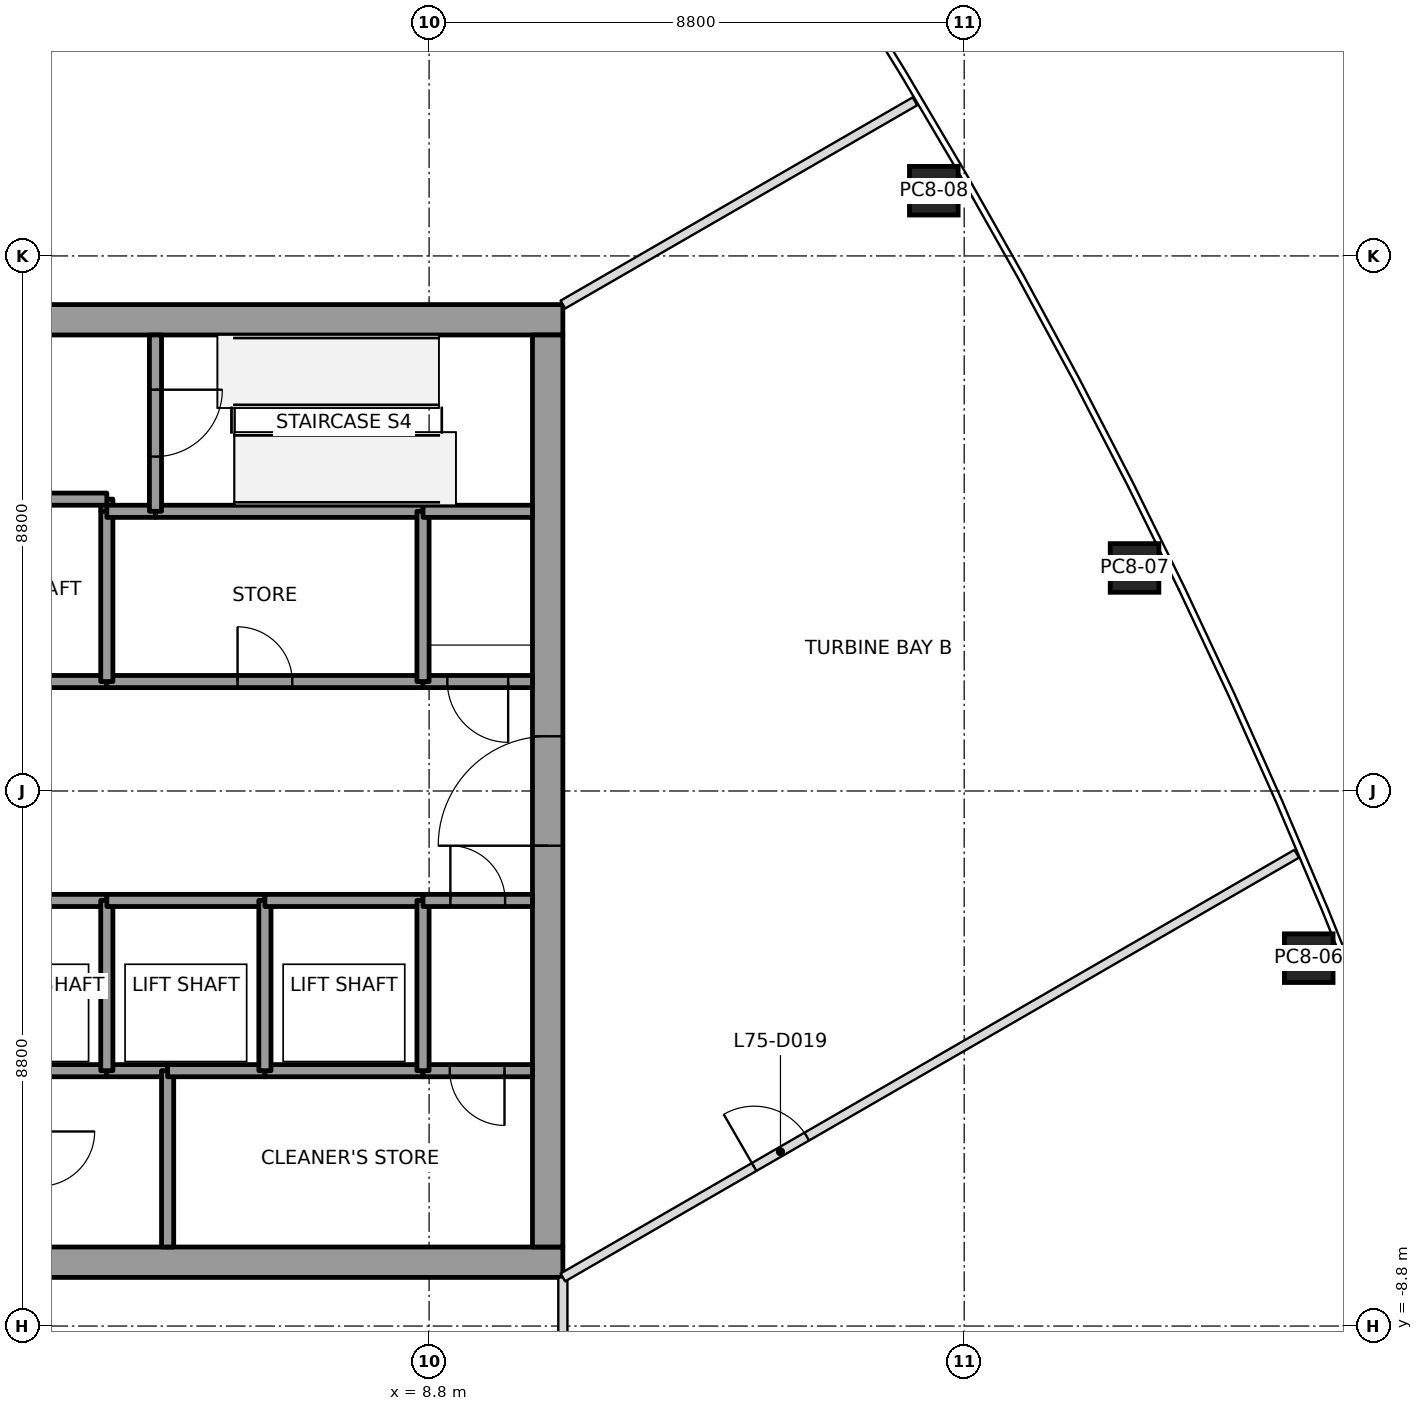
"""IFC4 building model, lengths in metres.
Left out: names, types, materials, properties, quantities, classifications, styles, units other than length and angle.
Written with IfcOpenShell. Run it as: python <this file> out.ifc"""

import sys

from ifc_helpers import new_model, si_unit, direction, frame, frame_2d, origin, origin_2d, place, context, subcontext, project, spatial, rectangle, extrude, clip, halfspace, element, fill, save


model = new_model("IFC4")
c1 = context("Model", 3, precision=1e-05, world=origin(), true_north=direction((0.0, 1.0)))
c2 = subcontext(c1, "Body", "Model", "MODEL_VIEW")
j1 = project(units=[si_unit("LENGTHUNIT", "METRE"), si_unit("PLANEANGLEUNIT", "RADIAN")], contexts=[c1])
p1 = place(None, origin())
s1 = spatial("IfcSite", under=j1, at=p1, CompositionType="ELEMENT")
p2 = place(p1, origin())
s2 = spatial("IfcBuilding", under=s1, at=p2, CompositionType="ELEMENT")
p3 = place(p2, frame((0.0, 0.0, 330.4)))
s3 = spatial("IfcBuildingStorey", under=s2, at=p3, CompositionType="ELEMENT", Elevation=330.4)
p4 = place(p3, frame((23.266, -2.75, 0.0), z_axis=(-0.00786643411, 0.004394352848, 0.999959403615), x_axis=(-0.375745247871, 0.926696342835, -0.007028291271)))
e1 = element("IfcColumn", 1, at=p4, inside=s3, PredefinedType="COLUMN", context=c2, shape_type="SweptSolid", body=[
    clip(clip(extrude(rectangle(XDim=0.8, YDim=0.8, at=origin_2d()), origin(), (0.0, 0.0, 1.0), 9.0), halfspace(frame((0.0, 0.0, 0.002)), True)), halfspace(frame((0.0, 0.0, 8.998)), False)),
])
p5 = place(p3, frame((20.402, 3.668, 0.0), z_axis=(-0.006211900374, 0.00086803848, 0.999980329208), x_axis=(-0.438919479413, 0.898519557244, -0.003506542606)))
e2 = element("IfcColumn", 2, at=p5, inside=s3, PredefinedType="COLUMN", context=c2, shape_type="SweptSolid", body=[
    clip(clip(extrude(rectangle(XDim=0.8, YDim=0.8, at=origin_2d()), origin(), (0.0, 0.0, 1.0), 9.0), halfspace(frame((0.0, 0.0, 0.001)), True)), halfspace(frame((0.0, 0.0, 8.998)), False)),
])
p6 = place(p3, frame((17.1, 9.873, 0.0), z_axis=(-0.004394474833, -0.002522754071, 0.999987162069), x_axis=(-0.499995172124, 0.866028191052, -1.2440216e-05)))
e3 = element("IfcColumn", 3, at=p6, inside=s3, PredefinedType="COLUMN", context=c2, shape_type="SweptSolid", body=[
    clip(clip(extrude(rectangle(XDim=0.8, YDim=0.8, at=origin_2d()), origin(), (0.0, 0.0, 1.0), 9.0), halfspace(frame((0.0, 0.0, 0.001)), True)), halfspace(frame((0.0, 0.0, 8.999)), False)),
])
p7 = place(p3, frame((-11.0, -7.75, 0.0), z_axis=(0.0, 0.0, 1.0), x_axis=(1.0, 0.0, 0.0)))
e4 = element("IfcWall", 4, at=p7, inside=s3, PredefinedType="SHEAR", context=c2, shape_type="SweptSolid", body=[
    extrude(rectangle(XDim=22.0, YDim=0.5, at=frame_2d((11.0, 0.0))), origin(), (0.0, 0.0, 1.0), 9.0),
])
p8 = place(p7, frame((10.45, 0.0, 0.0)))
e5 = element("IfcOpeningElement", 5, at=p8, cuts=e4, PredefinedType="OPENING", context=c2, shape_type="SweptSolid", body=[
    extrude(rectangle(XDim=1.1, YDim=2.1, at=frame_2d((0.55, 1.05))), frame((0.0, 0.25, 0.0), z_axis=(0.0, -1.0, 0.0), x_axis=(1.0, 0.0, 0.0)), (0.0, 0.0, 1.0), 0.5),
])
p9 = place(p3, frame((-11.0, 7.75, 0.0), z_axis=(0.0, 0.0, 1.0), x_axis=(1.0, 0.0, 0.0)))
e6 = element("IfcWall", 6, at=p9, inside=s3, PredefinedType="SHEAR", context=c2, shape_type="SweptSolid", body=[
    extrude(rectangle(XDim=22.0, YDim=0.5, at=frame_2d((11.0, 0.0))), origin(), (0.0, 0.0, 1.0), 9.0),
])
p10 = place(p9, frame((10.45, 0.0, 0.0)))
e7 = element("IfcOpeningElement", 7, at=p10, cuts=e6, PredefinedType="OPENING", context=c2, shape_type="SweptSolid", body=[
    extrude(rectangle(XDim=1.1, YDim=2.1, at=frame_2d((0.55, 1.05))), frame((0.0, 0.25, 0.0), z_axis=(0.0, -1.0, 0.0), x_axis=(1.0, 0.0, 0.0)), (0.0, 0.0, 1.0), 0.5),
])
p11 = place(p3, frame((10.75, -7.5, 0.0), z_axis=(0.0, 0.0, 1.0), x_axis=(0.0, 1.0, 0.0)))
e8 = element("IfcWall", 8, at=p11, inside=s3, PredefinedType="SHEAR", context=c2, shape_type="SweptSolid", body=[
    extrude(rectangle(XDim=15.0, YDim=0.5, at=frame_2d((7.5, 0.0))), origin(), (0.0, 0.0, 1.0), 9.0),
])
p12 = place(p11, frame((6.6, 0.0, 0.0)))
e9 = element("IfcOpeningElement", 9, at=p12, cuts=e8, PredefinedType="OPENING", context=c2, shape_type="SweptSolid", body=[
    extrude(rectangle(XDim=1.8, YDim=2.1, at=frame_2d((0.9, 1.05))), frame((0.0, 0.25, 0.0), z_axis=(0.0, -1.0, 0.0), x_axis=(1.0, 0.0, 0.0)), (0.0, 0.0, 1.0), 0.5),
])
for number, where, z_axis, x_axis in (
    (10, (0.9, -1.8, 0.0), (0.0, 0.0, 1.0), (1.0, 0.0, 0.0)),
    (11, (3.5, 1.8, 0.0), (0.0, 0.0, 1.0), (-1.0, 0.0, 0.0)),
):
    element("IfcWall", number, at=place(p3, frame(where, z_axis=z_axis, x_axis=x_axis)), inside=s3, PredefinedType="SOLIDWALL", context=c2, shape_type="SweptSolid", body=[
        extrude(rectangle(XDim=2.6, YDim=0.2, at=frame_2d((1.3, 0.0))), origin(), (0.0, 0.0, 1.0), 8.85),
    ])
p13 = place(p3, frame((3.5, 4.6, 0.0), z_axis=(0.0, 0.0, 1.0), x_axis=(0.0, 1.0, 0.0)))
e12 = element("IfcWall", 12, at=p13, inside=s3, PredefinedType="SOLIDWALL", context=c2, shape_type="SweptSolid", body=[
    extrude(rectangle(XDim=0.2, YDim=0.2, at=frame_2d((0.1, 0.0))), origin(), (0.0, 0.0, 1.0), 8.85),
])
p14 = place(p3, frame((3.5, 4.8, 0.0), z_axis=(0.0, 0.0, 1.0), x_axis=(-1.0, 0.0, 0.0)))
e13 = element("IfcWall", 13, at=p14, inside=s3, PredefinedType="SOLIDWALL", context=c2, shape_type="SweptSolid", body=[
    extrude(rectangle(XDim=2.6, YDim=0.2, at=frame_2d((1.3, 0.0))), origin(), (0.0, 0.0, 1.0), 8.85),
])
p15 = place(p3, frame((3.5, -4.6, 0.0), z_axis=(0.0, 0.0, 1.0), x_axis=(-1.0, 0.0, 0.0)))
e14 = element("IfcWall", 14, at=p15, inside=s3, PredefinedType="SOLIDWALL", context=c2, shape_type="SweptSolid", body=[
    extrude(rectangle(XDim=1.1, YDim=0.2, at=frame_2d((0.55, 0.0))), origin(), (0.0, 0.0, 1.0), 8.85),
])
p16 = place(p3, frame((4.5, -4.6, 0.0), z_axis=(0.0, 0.0, 1.0), x_axis=(-1.0, 0.0, 0.0)))
e15 = element("IfcWall", 15, at=p16, inside=s3, PredefinedType="SOLIDWALL", context=c2, shape_type="SweptSolid", body=[
    extrude(rectangle(XDim=1.0, YDim=0.2, at=frame_2d((0.5, 0.0))), origin(), (0.0, 0.0, 1.0), 8.85),
])
p17 = place(p3, frame((3.5, -4.6, 0.0), z_axis=(0.0, 0.0, 1.0), x_axis=(0.0, 1.0, 0.0)))
e16 = element("IfcWall", 16, at=p17, inside=s3, PredefinedType="SOLIDWALL", context=c2, shape_type="SweptSolid", body=[
    extrude(rectangle(XDim=2.8, YDim=0.2, at=frame_2d((1.4, 0.0))), origin(), (0.0, 0.0, 1.0), 8.85),
])
p18 = place(p3, frame((3.5, -1.8, 0.0), z_axis=(0.0, 0.0, 1.0), x_axis=(1.0, 0.0, 0.0)))
e17 = element("IfcWall", 17, at=p18, inside=s3, PredefinedType="SOLIDWALL", context=c2, shape_type="SweptSolid", body=[
    extrude(rectangle(XDim=2.6, YDim=0.2, at=frame_2d((1.3, 0.0))), origin(), (0.0, 0.0, 1.0), 8.85),
])
p19 = place(p3, frame((3.5, 1.8, 0.0), z_axis=(0.0, 0.0, 1.0), x_axis=(1.0, 0.0, 0.0)))
e18 = element("IfcWall", 18, at=p19, inside=s3, PredefinedType="SOLIDWALL", context=c2, shape_type="SweptSolid", body=[
    extrude(rectangle(XDim=5.2, YDim=0.2, at=frame_2d((2.6, 0.0))), origin(), (0.0, 0.0, 1.0), 8.85),
])
p20 = place(p19, frame((2.15, 0.0, 0.0)))
e19 = element("IfcOpeningElement", 19, at=p20, cuts=e18, PredefinedType="OPENING", context=c2, shape_type="SweptSolid", body=[
    extrude(rectangle(XDim=0.9, YDim=2.1, at=frame_2d((0.45, 1.05))), frame((0.0, 0.1, 0.0), z_axis=(0.0, -1.0, 0.0), x_axis=(1.0, 0.0, 0.0)), (0.0, 0.0, 1.0), 0.2),
])
p21 = place(p3, frame((3.5, 4.6, 0.0), z_axis=(0.0, 0.0, 1.0), x_axis=(0.0, -1.0, 0.0)))
e20 = element("IfcWall", 20, at=p21, inside=s3, PredefinedType="SOLIDWALL", context=c2, shape_type="SweptSolid", body=[
    extrude(rectangle(XDim=2.8, YDim=0.2, at=frame_2d((1.4, 0.0))), origin(), (0.0, 0.0, 1.0), 8.85),
])
p22 = place(p3, frame((4.3, 4.6, 0.0), z_axis=(0.0, 0.0, 1.0), x_axis=(-1.0, 0.0, 0.0)))
e21 = element("IfcWall", 21, at=p22, inside=s3, PredefinedType="SOLIDWALL", context=c2, shape_type="SweptSolid", body=[
    extrude(rectangle(XDim=0.8, YDim=0.2, at=frame_2d((0.4, 0.0))), origin(), (0.0, 0.0, 1.0), 8.85),
])
p23 = place(p3, frame((8.7, 4.6, 0.0), z_axis=(0.0, 0.0, 1.0), x_axis=(-1.0, 0.0, 0.0)))
e22 = element("IfcWall", 22, at=p23, inside=s3, PredefinedType="SOLIDWALL", context=c2, shape_type="SweptSolid", body=[
    extrude(rectangle(XDim=4.4, YDim=0.2, at=frame_2d((2.2, 0.0))), origin(), (0.0, 0.0, 1.0), 8.85),
])
p24 = place(p3, frame((4.3, 7.5, 0.0), z_axis=(0.0, 0.0, 1.0), x_axis=(0.0, -1.0, 0.0)))
e23 = element("IfcWall", 23, at=p24, inside=s3, PredefinedType="SOLIDWALL", context=c2, shape_type="SweptSolid", body=[
    extrude(rectangle(XDim=2.9, YDim=0.2, at=frame_2d((1.45, 0.0))), origin(), (0.0, 0.0, 1.0), 8.85),
])
p25 = place(p24, frame((0.9, 0.0, 0.0)))
e24 = element("IfcOpeningElement", 24, at=p25, cuts=e23, PredefinedType="OPENING", context=c2, shape_type="SweptSolid", body=[
    extrude(rectangle(XDim=1.1, YDim=2.1, at=frame_2d((0.55, 1.05))), frame((0.0, 0.1, 0.0), z_axis=(0.0, -1.0, 0.0), x_axis=(1.0, 0.0, 0.0)), (0.0, 0.0, 1.0), 0.2),
])
p26 = place(p3, frame((4.5, -4.6, 0.0), z_axis=(0.0, 0.0, 1.0), x_axis=(0.0, -1.0, 0.0)))
e25 = element("IfcWall", 25, at=p26, inside=s3, PredefinedType="SOLIDWALL", context=c2, shape_type="SweptSolid", body=[
    extrude(rectangle(XDim=2.9, YDim=0.2, at=frame_2d((1.45, 0.0))), origin(), (0.0, 0.0, 1.0), 8.85),
])
p27 = place(p3, frame((6.1, -4.6, 0.0), z_axis=(0.0, 0.0, 1.0), x_axis=(-1.0, 0.0, 0.0)))
e26 = element("IfcWall", 26, at=p27, inside=s3, PredefinedType="SOLIDWALL", context=c2, shape_type="SweptSolid", body=[
    extrude(rectangle(XDim=1.6, YDim=0.2, at=frame_2d((0.8, 0.0))), origin(), (0.0, 0.0, 1.0), 8.85),
])
p28 = place(p3, frame((8.7, -4.6, 0.0), z_axis=(0.0, 0.0, 1.0), x_axis=(-1.0, 0.0, 0.0)))
e27 = element("IfcWall", 27, at=p28, inside=s3, PredefinedType="SOLIDWALL", context=c2, shape_type="SweptSolid", body=[
    extrude(rectangle(XDim=2.6, YDim=0.2, at=frame_2d((1.3, 0.0))), origin(), (0.0, 0.0, 1.0), 8.85),
])
p29 = place(p3, frame((6.1, -4.6, 0.0), z_axis=(0.0, 0.0, 1.0), x_axis=(0.0, 1.0, 0.0)))
e28 = element("IfcWall", 28, at=p29, inside=s3, PredefinedType="SOLIDWALL", context=c2, shape_type="SweptSolid", body=[
    extrude(rectangle(XDim=2.8, YDim=0.2, at=frame_2d((1.4, 0.0))), origin(), (0.0, 0.0, 1.0), 8.85),
])
p30 = place(p3, frame((6.1, -1.8, 0.0), z_axis=(0.0, 0.0, 1.0), x_axis=(1.0, 0.0, 0.0)))
e29 = element("IfcWall", 29, at=p30, inside=s3, PredefinedType="SOLIDWALL", context=c2, shape_type="SweptSolid", body=[
    extrude(rectangle(XDim=2.6, YDim=0.2, at=frame_2d((1.3, 0.0))), origin(), (0.0, 0.0, 1.0), 8.85),
])
p31 = place(p3, frame((10.5, -4.6, 0.0), z_axis=(0.0, 0.0, 1.0), x_axis=(-1.0, 0.0, 0.0)))
e30 = element("IfcWall", 30, at=p31, inside=s3, PredefinedType="SOLIDWALL", context=c2, shape_type="SweptSolid", body=[
    extrude(rectangle(XDim=1.8, YDim=0.2, at=frame_2d((0.9, 0.0))), origin(), (0.0, 0.0, 1.0), 8.85),
])
p32 = place(p31, frame((0.46, 0.0, 0.0)))
e31 = element("IfcOpeningElement", 31, at=p32, cuts=e30, PredefinedType="OPENING", context=c2, shape_type="SweptSolid", body=[
    extrude(rectangle(XDim=0.9, YDim=2.1, at=frame_2d((0.45, 1.05))), frame((0.0, 0.1, 0.0), z_axis=(0.0, -1.0, 0.0), x_axis=(1.0, 0.0, 0.0)), (0.0, 0.0, 1.0), 0.2),
])
p33 = place(p3, frame((8.7, -1.8, 0.0), z_axis=(0.0, 0.0, 1.0), x_axis=(0.0, -1.0, 0.0)))
e32 = element("IfcWall", 32, at=p33, inside=s3, PredefinedType="SOLIDWALL", context=c2, shape_type="SweptSolid", body=[
    extrude(rectangle(XDim=2.8, YDim=0.2, at=frame_2d((1.4, 0.0))), origin(), (0.0, 0.0, 1.0), 8.85),
])
p34 = place(p3, frame((8.7, -1.8, 0.0), z_axis=(0.0, 0.0, 1.0), x_axis=(1.0, 0.0, 0.0)))
e33 = element("IfcWall", 33, at=p34, inside=s3, PredefinedType="SOLIDWALL", context=c2, shape_type="SweptSolid", body=[
    extrude(rectangle(XDim=1.8, YDim=0.2, at=frame_2d((0.9, 0.0))), origin(), (0.0, 0.0, 1.0), 8.85),
])
p35 = place(p34, frame((0.45, 0.0, 0.0)))
e34 = element("IfcOpeningElement", 34, at=p35, cuts=e33, PredefinedType="OPENING", context=c2, shape_type="SweptSolid", body=[
    extrude(rectangle(XDim=0.9, YDim=2.1, at=frame_2d((0.45, 1.05))), frame((0.0, 0.1, 0.0), z_axis=(0.0, -1.0, 0.0), x_axis=(1.0, 0.0, 0.0)), (0.0, 0.0, 1.0), 0.2),
])
p36 = place(p3, frame((10.5, 1.8, 0.0), z_axis=(0.0, 0.0, 1.0), x_axis=(-1.0, 0.0, 0.0)))
e35 = element("IfcWall", 35, at=p36, inside=s3, PredefinedType="SOLIDWALL", context=c2, shape_type="SweptSolid", body=[
    extrude(rectangle(XDim=1.8, YDim=0.2, at=frame_2d((0.9, 0.0))), origin(), (0.0, 0.0, 1.0), 8.85),
])
p37 = place(p36, frame((0.4, 0.0, 0.0)))
e36 = element("IfcOpeningElement", 36, at=p37, cuts=e35, PredefinedType="OPENING", context=c2, shape_type="SweptSolid", body=[
    extrude(rectangle(XDim=1.0, YDim=2.1, at=frame_2d((0.5, 1.05))), frame((0.0, 0.1, 0.0), z_axis=(0.0, -1.0, 0.0), x_axis=(1.0, 0.0, 0.0)), (0.0, 0.0, 1.0), 0.2),
])
p38 = place(p3, frame((8.7, 1.8, 0.0), z_axis=(0.0, 0.0, 1.0), x_axis=(0.0, 1.0, 0.0)))
e37 = element("IfcWall", 37, at=p38, inside=s3, PredefinedType="SOLIDWALL", context=c2, shape_type="SweptSolid", body=[
    extrude(rectangle(XDim=2.8, YDim=0.2, at=frame_2d((1.4, 0.0))), origin(), (0.0, 0.0, 1.0), 8.85),
])
p39 = place(p3, frame((10.5, 4.6, 0.0), z_axis=(0.0, 0.0, 1.0), x_axis=(-1.0, 0.0, 0.0)))
e38 = element("IfcWall", 38, at=p39, inside=s3, PredefinedType="SOLIDWALL", context=c2, shape_type="SweptSolid", body=[
    extrude(rectangle(XDim=1.8, YDim=0.2, at=frame_2d((0.9, 0.0))), origin(), (0.0, 0.0, 1.0), 8.85),
])
p40 = place(p3, frame((11.0, -19.628, 0.0), z_axis=(0.0, 0.0, 1.0), x_axis=(0.0, 1.0, 0.0)))
e39 = element("IfcWall", 39, at=p40, inside=s3, PredefinedType="PARTITIONING", context=c2, shape_type="SweptSolid", body=[
    extrude(rectangle(XDim=11.628, YDim=0.15, at=frame_2d((5.814, 0.0))), origin(), (0.0, 0.0, 1.0), 8.083),
])
p41 = place(p3, frame((11.0, -8.0, 0.0), z_axis=(0.0, 0.0, 1.0), x_axis=(0.866022206254, 0.500005538244, 0.0)))
e40 = element("IfcWall", 40, at=p41, inside=s3, PredefinedType="PARTITIONING", context=c2, shape_type="SweptSolid", body=[
    extrude(rectangle(XDim=13.935, YDim=0.15, at=frame_2d((6.968, 0.0))), origin(), (0.0, 0.0, 1.0), 8.083),
])
p42 = place(p41, frame((3.632, 0.0, 0.0)))
e41 = element("IfcOpeningElement", 41, at=p42, cuts=e40, PredefinedType="OPENING", context=c2, shape_type="SweptSolid", body=[
    extrude(rectangle(XDim=1.0, YDim=2.1, at=frame_2d((0.5, 1.05))), frame((0.0, 0.075, 0.0), z_axis=(0.0, -1.0, 0.0), x_axis=(1.0, 0.0, 0.0)), (0.0, 0.0, 1.0), 0.15),
])
p43 = place(p3, frame((11.0, 8.0, 0.0), z_axis=(0.0, 0.0, 1.0), x_axis=(0.866025662054, 0.499999552663, 0.0)))
e42 = element("IfcWall", 42, at=p43, inside=s3, PredefinedType="PARTITIONING", context=c2, shape_type="SweptSolid", body=[
    extrude(rectangle(XDim=6.686, YDim=0.15, at=frame_2d((3.343, 0.0))), origin(), (0.0, 0.0, 1.0), 8.083),
])
p44 = place(p42, origin())
e43 = element("IfcDoor", 43, at=p44, inside=s3, OperationType="SINGLE_SWING_LEFT", PredefinedType="DOOR", context=c2, shape_type="SweptSolid", body=[
    extrude(rectangle(XDim=1.0, YDim=2.1, at=frame_2d((0.5, 1.05))), frame((0.0, 0.025, 0.0), z_axis=(0.0, -1.0, 0.0), x_axis=(1.0, 0.0, 0.0)), (0.0, 0.0, 1.0), 0.05),
])
fill(e41, e43)
p45 = place(p37, origin())
e44 = element("IfcDoor", 44, at=p45, inside=s3, OperationType="SINGLE_SWING_RIGHT", PredefinedType="DOOR", context=c2, shape_type="SweptSolid", body=[
    extrude(rectangle(XDim=1.0, YDim=2.1, at=frame_2d((0.5, 1.05))), frame((0.0, 0.025, 0.0), z_axis=(0.0, -1.0, 0.0), x_axis=(1.0, 0.0, 0.0)), (0.0, 0.0, 1.0), 0.05),
])
fill(e36, e44)
p46 = place(p25, origin())
e45 = element("IfcDoor", 45, at=p46, inside=s3, OperationType="SINGLE_SWING_LEFT", PredefinedType="DOOR", context=c2, shape_type="SweptSolid", body=[
    extrude(rectangle(XDim=1.1, YDim=2.1, at=frame_2d((0.55, 1.05))), frame((0.0, 0.025, 0.0), z_axis=(0.0, -1.0, 0.0), x_axis=(1.0, 0.0, 0.0)), (0.0, 0.0, 1.0), 0.05),
])
fill(e24, e45)
p47 = place(p20, origin())
e46 = element("IfcDoor", 46, at=p47, inside=s3, OperationType="SINGLE_SWING_RIGHT", PredefinedType="DOOR", context=c2, shape_type="SweptSolid", body=[
    extrude(rectangle(XDim=0.9, YDim=2.1, at=frame_2d((0.45, 1.05))), frame((0.0, 0.025, 0.0), z_axis=(0.0, -1.0, 0.0), x_axis=(1.0, 0.0, 0.0)), (0.0, 0.0, 1.0), 0.05),
])
fill(e19, e46)
p48 = place(p32, origin())
e47 = element("IfcDoor", 47, at=p48, inside=s3, OperationType="SINGLE_SWING_LEFT", PredefinedType="DOOR", context=c2, shape_type="SweptSolid", body=[
    extrude(rectangle(XDim=0.9, YDim=2.1, at=frame_2d((0.45, 1.05))), frame((0.0, 0.025, 0.0), z_axis=(0.0, -1.0, 0.0), x_axis=(1.0, 0.0, 0.0)), (0.0, 0.0, 1.0), 0.05),
])
fill(e31, e47)
p49 = place(p35, origin())
e48 = element("IfcDoor", 48, at=p49, inside=s3, OperationType="SINGLE_SWING_LEFT", PredefinedType="DOOR", context=c2, shape_type="SweptSolid", body=[
    extrude(rectangle(XDim=0.9, YDim=2.1, at=frame_2d((0.45, 1.05))), frame((0.0, 0.025, 0.0), z_axis=(0.0, -1.0, 0.0), x_axis=(1.0, 0.0, 0.0)), (0.0, 0.0, 1.0), 0.05),
])
fill(e34, e48)
p50 = place(p12, origin())
e49 = element("IfcDoor", 49, at=p50, inside=s3, OperationType="DOUBLE_DOOR_SINGLE_SWING", PredefinedType="DOOR", context=c2, shape_type="SweptSolid", body=[
    extrude(rectangle(XDim=1.8, YDim=2.1, at=frame_2d((0.9, 1.05))), frame((0.0, 0.025, 0.0), z_axis=(0.0, -1.0, 0.0), x_axis=(1.0, 0.0, 0.0)), (0.0, 0.0, 1.0), 0.05),
])
fill(e9, e49)
save(model, sys.argv[1])
